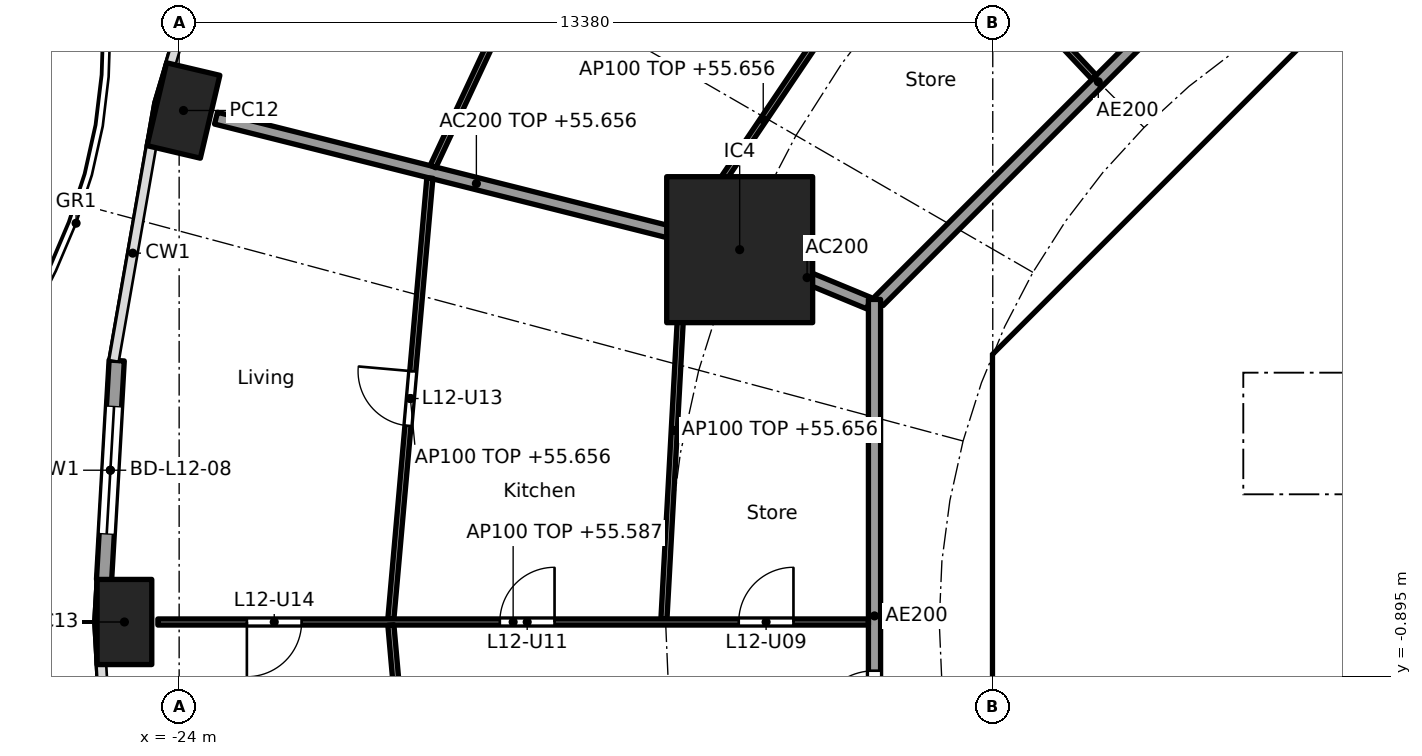
"""IFC4 building model, lengths in metres.
Left out: names, types, materials, properties, quantities, classifications, styles, units other than length and angle.
Written with IfcOpenShell. Run it as: python <this file> out.ifc"""

import sys

from ifc_helpers import new_model, si_unit, direction, frame, frame_2d, origin, origin_2d, place, context, subcontext, project, spatial, polyline, rectangle, hollow_rectangle, outline, extrude, element, fill, save


model = new_model("IFC4")
c1 = context("Model", 3, precision=1e-05, world=origin(), true_north=direction((0.0, 1.0)))
c2 = subcontext(c1, "Body", "Model", "MODEL_VIEW")
j1 = project(units=[si_unit("LENGTHUNIT", "METRE"), si_unit("PLANEANGLEUNIT", "RADIAN")], contexts=[c1])
p1 = place(None, origin())
s1 = spatial("IfcSite", under=j1, at=p1, CompositionType="ELEMENT")
p2 = place(p1, origin())
s2 = spatial("IfcBuilding", under=s1, at=p2, CompositionType="ELEMENT")
p3 = place(p2, frame((0.0, 0.0, 52.9)))
s3 = spatial("IfcBuildingStorey", under=s2, at=p3, CompositionType="ELEMENT", Elevation=52.9)
for number, where, z_axis, x_axis in (
    (1, (-23.929, 8.412, 0.0), (0.0, 0.0, 1.0), (-0.229, -0.973, 0.0)),
    (2, (-24.9, 0.0, 0.0), (0.0, 0.0, 1.0), (0.0, -1.0, 0.0)),
):
    element("IfcColumn", number, at=place(p3, frame(where, z_axis=z_axis, x_axis=x_axis)), inside=s3, PredefinedType="COLUMN", context=c2, shape_type="SweptSolid", body=[
        extrude(hollow_rectangle(XDim=1.4, YDim=0.9, WallThickness=0.05, at=origin_2d()), origin(), (0.0, 0.0, 1.0), 3.7),
    ])
p4 = place(p3, frame((-14.782, 6.123, 0.0), z_axis=(0.0, 0.0, 1.0), x_axis=(1.0, 0.0, 0.0)))
e3 = element("IfcColumn", 3, at=p4, inside=s3, PredefinedType="COLUMN", context=c2, shape_type="SweptSolid", body=[
    extrude(rectangle(XDim=2.4, YDim=2.4, at=origin_2d()), origin(), (0.0, 0.0, 1.0), 3.7),
])
p5 = place(p3, frame((-25.235, 0.692, 0.0), z_axis=(0.0, 0.0, 1.0), x_axis=(0.057478727308, 0.998346731305, 0.0)))
e4 = element("IfcWall", 4, at=p5, inside=s3, PredefinedType="SOLIDWALL", context=c2, shape_type="SweptSolid", body=[
    extrude(rectangle(XDim=3.615, YDim=0.25, at=frame_2d((1.807, 0.0))), origin(), (0.0, 0.0, 1.0), 3.44),
])
p6 = place(p5, frame((0.757, 0.0, 0.0)))
e5 = element("IfcOpeningElement", 5, at=p6, cuts=e4, PredefinedType="OPENING", context=c2, shape_type="SweptSolid", body=[
    extrude(rectangle(XDim=2.1, YDim=2.4, at=frame_2d((1.05, 1.2))), frame((0.0, 0.135, 0.0), z_axis=(0.0, -1.0, 0.0), x_axis=(1.0, 0.0, 0.0)), (0.0, 0.0, 1.0), 0.27),
])
p7 = place(p3, frame((-4.613, 9.988, 0.0), z_axis=(0.0, 0.0, 1.0), x_axis=(-0.707106781187, -0.707106781187, 0.0)))
e6 = element("IfcWall", 6, at=p7, inside=s3, PredefinedType="SHEAR", context=c2, shape_type="SweptSolid", body=[
    extrude(rectangle(XDim=7.602, YDim=0.6, at=frame_2d((3.801, 0.0))), origin(), (0.0, 0.0, 1.0), 3.44),
])
p8 = place(p7, frame((0.351, 0.0, 0.0)))
e7 = element("IfcOpeningElement", 7, at=p8, cuts=e6, PredefinedType="OPENING", context=c2, shape_type="SweptSolid", body=[
    extrude(rectangle(XDim=1.1, YDim=2.1, at=frame_2d((0.55, 1.05))), frame((0.0, 0.31, 0.0), z_axis=(0.0, -1.0, 0.0), x_axis=(1.0, 0.0, 0.0)), (0.0, 0.0, 1.0), 0.62),
])
p9 = place(p3, frame((-10.325, 3.801, 0.0), z_axis=(0.0, 0.0, 1.0), x_axis=(0.0, -1.0, 0.0)))
e8 = element("IfcWall", 8, at=p9, inside=s3, PredefinedType="SHEAR", context=c2, shape_type="SweptSolid", body=[
    extrude(rectangle(XDim=7.602, YDim=0.6, at=frame_2d((3.801, 0.0))), origin(), (0.0, 0.0, 1.0), 3.44),
])
p10 = place(p9, frame((0.651, 0.0, 0.0)))
e9 = element("IfcOpeningElement", 9, at=p10, cuts=e8, PredefinedType="OPENING", context=c2, shape_type="SweptSolid", body=[
    extrude(rectangle(XDim=1.5, YDim=2.1, at=frame_2d((0.75, 1.05))), frame((0.0, 0.31, 0.0), z_axis=(0.0, -1.0, 0.0), x_axis=(1.0, 0.0, 0.0)), (0.0, 0.0, 1.0), 0.62),
])
p11 = place(p9, frame((5.451, 0.0, 0.0)))
e10 = element("IfcOpeningElement", 10, at=p11, cuts=e8, PredefinedType="OPENING", context=c2, shape_type="SweptSolid", body=[
    extrude(rectangle(XDim=1.5, YDim=2.1, at=frame_2d((0.75, 1.05))), frame((0.0, 0.31, 0.0), z_axis=(0.0, -1.0, 0.0), x_axis=(1.0, 0.0, 0.0)), (0.0, 0.0, 1.0), 0.62),
])
p12 = place(p3, frame((-5.8, 4.3, 0.0), z_axis=(0.0, 0.0, 1.0), x_axis=(0.0, 1.0, 0.0)))
e11 = element("IfcWall", 11, at=p12, inside=s3, PredefinedType="PARTITIONING", context=c2, shape_type="SweptSolid", body=[
    extrude(rectangle(XDim=3.927, YDim=0.15, at=frame_2d((1.963, 0.0))), origin(), (0.0, 0.0, 1.0), 3.44),
])
p13 = place(p12, frame((1.551, 0.0, 0.0)))
e12 = element("IfcOpeningElement", 12, at=p13, cuts=e11, PredefinedType="OPENING", context=c2, shape_type="SweptSolid", body=[
    extrude(rectangle(XDim=0.9, YDim=2.1, at=frame_2d((0.45, 1.05))), frame((0.0, 0.085, 0.0), z_axis=(0.0, -1.0, 0.0), x_axis=(1.0, 0.0, 0.0)), (0.0, 0.0, 1.0), 0.17),
])
p14 = place(p3, frame((-6.7, 2.0, 0.0), z_axis=(0.0, 0.0, 1.0), x_axis=(1.0, 0.0, 0.0)))
e13 = element("IfcWall", 13, at=p14, inside=s3, PredefinedType="SOLIDWALL", context=c2, shape_type="SweptSolid", body=[
    extrude(rectangle(XDim=13.4, YDim=0.2, at=frame_2d((6.7, 0.0))), origin(), (0.0, 0.0, 1.0), 3.44),
])
p15 = place(p14, frame((0.65, 0.0, 0.0)))
e14 = element("IfcOpeningElement", 14, at=p15, cuts=e13, PredefinedType="OPENING", context=c2, shape_type="SweptSolid", body=[
    extrude(rectangle(XDim=1.1, YDim=2.1, at=frame_2d((0.55, 1.05))), frame((0.0, 0.11, 0.0), z_axis=(0.0, -1.0, 0.0), x_axis=(1.0, 0.0, 0.0)), (0.0, 0.0, 1.0), 0.22),
])
p16 = place(p14, frame((2.85, 0.0, 0.0)))
e15 = element("IfcOpeningElement", 15, at=p16, cuts=e13, PredefinedType="OPENING", context=c2, shape_type="SweptSolid", body=[
    extrude(rectangle(XDim=1.1, YDim=2.1, at=frame_2d((0.55, 1.05))), frame((0.0, 0.11, 0.0), z_axis=(0.0, -1.0, 0.0), x_axis=(1.0, 0.0, 0.0)), (0.0, 0.0, 1.0), 0.22),
])
p17 = place(p14, frame((5.05, 0.0, 0.0)))
e16 = element("IfcOpeningElement", 16, at=p17, cuts=e13, PredefinedType="OPENING", context=c2, shape_type="SweptSolid", body=[
    extrude(rectangle(XDim=1.1, YDim=2.1, at=frame_2d((0.55, 1.05))), frame((0.0, 0.11, 0.0), z_axis=(0.0, -1.0, 0.0), x_axis=(1.0, 0.0, 0.0)), (0.0, 0.0, 1.0), 0.22),
])
p18 = place(p3, origin())
e17 = element("IfcWall", 17, at=p18, inside=s3, PredefinedType="SHEAR", context=c2, shape_type="SweptSolid", body=[
    extrude(outline(polyline([(-10.2, 4.825), (-9.776, 4.401), (-10.025, 4.152), (-10.025, 3.801), (-10.625, 3.801), (-10.625, 4.401), (-10.2, 4.825)])), origin(), (0.0, 0.0, 1.0), 3.44),
])
p19 = place(p3, origin())
e18 = element("IfcWall", 18, at=p19, inside=s3, PredefinedType="SOLIDWALL", context=c2, shape_type="SweptSolid", body=[
    extrude(outline(polyline([(-6.5, 2.1), (-6.7, 2.1), (-6.7, 4.3), (6.7, 4.3), (6.7, 2.1), (6.5, 2.1), (6.5, 4.1), (4.5, 4.1), (4.5, 2.1), (4.3, 2.1), (4.3, 4.1), (2.3, 4.1), (2.3, 2.1), (2.1, 2.1), (2.1, 4.1), (0.1, 4.1), (0.1, 2.1), (-0.1, 2.1), (-0.1, 4.1), (-2.1, 4.1), (-2.1, 2.1), (-2.3, 2.1), (-2.3, 4.1), (-4.3, 4.1), (-4.3, 2.1), (-4.5, 2.1), (-4.5, 4.1), (-6.5, 4.1), (-6.5, 2.1)])), origin(), (0.0, 0.0, 1.0), 3.44),
])
p20 = place(p3, frame((-10.025, 4.0, 0.0), z_axis=(0.0, 0.0, 1.0), x_axis=(1.0, 0.0, 0.0)))
e19 = element("IfcWall", 19, at=p20, inside=s3, PredefinedType="PARTITIONING", context=c2, shape_type="SweptSolid", body=[
    extrude(rectangle(XDim=3.325, YDim=0.2, at=frame_2d((1.662, 0.0))), origin(), (0.0, 0.0, 1.0), 3.44),
])
p21 = place(p3, frame((-12.657, 5.243, 0.0), z_axis=(0.0, 0.0, 1.0), x_axis=(-0.923885664896, 0.382668627144, 0.0)))
e20 = element("IfcWall", 20, at=p21, inside=s3, PredefinedType="PARTITIONING", context=c2, shape_type="SweptSolid", body=[
    extrude(rectangle(XDim=2.2, YDim=0.2, at=frame_2d((1.1, 0.0))), origin(), (0.0, 0.0, 1.0), 3.44),
])
p22 = place(p3, frame((-14.831, 6.135, 0.0), z_axis=(0.0, 0.0, 1.0), x_axis=(-0.969884949569, 0.243563512454, 0.0)))
e21 = element("IfcWall", 21, at=p22, inside=s3, PredefinedType="PARTITIONING", context=c2, shape_type="SweptSolid", body=[
    extrude(rectangle(XDim=8.829, YDim=0.2, at=frame_2d((4.415, 0.0))), origin(), (0.0, 0.0, 1.0), 2.756),
])
p23 = place(p3, frame((-5.275, 12.494, 0.0), z_axis=(0.0, 0.0, 1.0), x_axis=(-0.707106781187, -0.707106781187, 0.0)))
e22 = element("IfcWall", 22, at=p23, inside=s3, PredefinedType="PARTITIONING", context=c2, shape_type="SweptSolid", body=[
    extrude(rectangle(XDim=10.209, YDim=0.2, at=frame_2d((5.104, 0.0))), origin(), (0.0, 0.0, 1.0), 3.44),
])
p24 = place(p23, frame((2.87, 0.0, 0.0)))
e23 = element("IfcOpeningElement", 23, at=p24, cuts=e22, PredefinedType="OPENING", context=c2, shape_type="SweptSolid", body=[
    extrude(rectangle(XDim=1.0, YDim=2.1, at=frame_2d((0.5, 1.05))), frame((0.0, 0.11, 0.0), z_axis=(0.0, -1.0, 0.0), x_axis=(1.0, 0.0, 0.0)), (0.0, 0.0, 1.0), 0.22),
])
p25 = place(p3, frame((-12.565, 5.304, 0.0), z_axis=(0.0, 0.0, 1.0), x_axis=(0.0, -1.0, 0.0)))
e24 = element("IfcWall", 24, at=p25, inside=s3, PredefinedType="PARTITIONING", context=c2, shape_type="SweptSolid", body=[
    extrude(rectangle(XDim=10.409, YDim=0.2, at=frame_2d((5.205, 0.0))), origin(), (0.0, 0.0, 1.0), 3.44),
])
p26 = place(p25, frame((6.106, 0.0, 0.0)))
e25 = element("IfcOpeningElement", 25, at=p26, cuts=e24, PredefinedType="OPENING", context=c2, shape_type="SweptSolid", body=[
    extrude(rectangle(XDim=1.0, YDim=2.1, at=frame_2d((0.5, 1.05))), frame((0.0, 0.11, 0.0), z_axis=(0.0, -1.0, 0.0), x_axis=(1.0, 0.0, 0.0)), (0.0, 0.0, 1.0), 0.22),
])
p27 = place(p3, frame((-8.953, 8.958, 0.0), z_axis=(0.0, 0.0, 1.0), x_axis=(-0.684574307023, 0.728943082939, 0.0)))
e26 = element("IfcWall", 26, at=p27, inside=s3, PredefinedType="PARTITIONING", context=c2, shape_type="SweptSolid", body=[
    extrude(rectangle(XDim=15.231, YDim=0.1, at=frame_2d((7.615, 0.0))), origin(), (0.0, 0.0, 1.0), 2.687),
])
p28 = place(p27, frame((1.54, 0.0, 0.0)))
e27 = element("IfcOpeningElement", 27, at=p28, cuts=e26, PredefinedType="OPENING", context=c2, shape_type="SweptSolid", body=[
    extrude(rectangle(XDim=0.9, YDim=2.1, at=frame_2d((0.45, 1.05))), frame((0.0, 0.06, 0.0), z_axis=(0.0, -1.0, 0.0), x_axis=(1.0, 0.0, 0.0)), (0.0, 0.0, 1.0), 0.12),
])
p29 = place(p27, frame((6.174, 0.0, 0.0)))
e28 = element("IfcOpeningElement", 28, at=p29, cuts=e26, PredefinedType="OPENING", context=c2, shape_type="SweptSolid", body=[
    extrude(rectangle(XDim=0.9, YDim=2.1, at=frame_2d((0.45, 1.05))), frame((0.0, 0.06, 0.0), z_axis=(0.0, -1.0, 0.0), x_axis=(1.0, 0.0, 0.0)), (0.0, 0.0, 1.0), 0.12),
])
p30 = place(p27, frame((11.8, 0.0, 0.0)))
e29 = element("IfcOpeningElement", 29, at=p30, cuts=e26, PredefinedType="OPENING", context=c2, shape_type="SweptSolid", body=[
    extrude(rectangle(XDim=0.9, YDim=2.1, at=frame_2d((0.45, 1.05))), frame((0.0, 0.06, 0.0), z_axis=(0.0, -1.0, 0.0), x_axis=(1.0, 0.0, 0.0)), (0.0, 0.0, 1.0), 0.12),
])
p31 = place(p3, frame((-13.162, 10.087, 0.0), z_axis=(0.0, 0.0, 1.0), x_axis=(-0.55912750241, -0.829081682375, 0.0)))
e30 = element("IfcWall", 30, at=p31, inside=s3, PredefinedType="PARTITIONING", context=c2, shape_type="SweptSolid", body=[
    extrude(rectangle(XDim=4.408, YDim=0.1, at=frame_2d((2.204, 0.0))), origin(), (0.0, 0.0, 1.0), 2.756),
])
p32 = place(p3, frame((-17.203, 13.095, 0.0), z_axis=(0.0, 0.0, 1.0), x_axis=(-0.423926333401, -0.905696673202, 0.0)))
e31 = element("IfcWall", 31, at=p32, inside=s3, PredefinedType="PARTITIONING", context=c2, shape_type="SweptSolid", body=[
    extrude(rectangle(XDim=6.188, YDim=0.1, at=frame_2d((3.094, 0.0))), origin(), (0.0, 0.0, 1.0), 2.756),
])
p33 = place(p3, frame((-15.688, 6.249, 0.0), z_axis=(0.0, 0.0, 1.0), x_axis=(-0.054659814056, -0.998505034903, 0.0)))
e32 = element("IfcWall", 32, at=p33, inside=s3, PredefinedType="PARTITIONING", context=c2, shape_type="SweptSolid", body=[
    extrude(rectangle(XDim=6.208, YDim=0.1, at=frame_2d((3.104, 0.0))), origin(), (0.0, 0.0, 1.0), 2.756),
])
p34 = place(p3, frame((-19.877, 7.301, 0.0), z_axis=(0.0, 0.0, 1.0), x_axis=(-0.088143415068, -0.996107794558, 0.0)))
e33 = element("IfcWall", 33, at=p34, inside=s3, PredefinedType="PARTITIONING", context=c2, shape_type="SweptSolid", body=[
    extrude(rectangle(XDim=7.279, YDim=0.1, at=frame_2d((3.64, 0.0))), origin(), (0.0, 0.0, 1.0), 2.756),
])
p35 = place(p34, frame((3.189, 0.0, 0.0)))
e34 = element("IfcOpeningElement", 34, at=p35, cuts=e33, PredefinedType="OPENING", context=c2, shape_type="SweptSolid", body=[
    extrude(rectangle(XDim=0.9, YDim=2.1, at=frame_2d((0.45, 1.05))), frame((0.0, 0.06, 0.0), z_axis=(0.0, -1.0, 0.0), x_axis=(1.0, 0.0, 0.0)), (0.0, 0.0, 1.0), 0.12),
])
p36 = place(p3, frame((-12.665, 0.0, 0.0), z_axis=(0.0, 0.0, 1.0), x_axis=(-1.0, 0.0, 0.0)))
e35 = element("IfcWall", 35, at=p36, inside=s3, PredefinedType="PARTITIONING", context=c2, shape_type="SweptSolid", body=[
    extrude(rectangle(XDim=11.685, YDim=0.1, at=frame_2d((5.843, 0.0))), origin(), (0.0, 0.0, 1.0), 2.687),
])
p37 = place(p36, frame((1.233, 0.0, 0.0)))
e36 = element("IfcOpeningElement", 36, at=p37, cuts=e35, PredefinedType="OPENING", context=c2, shape_type="SweptSolid", body=[
    extrude(rectangle(XDim=0.9, YDim=2.1, at=frame_2d((0.45, 1.05))), frame((0.0, 0.06, 0.0), z_axis=(0.0, -1.0, 0.0), x_axis=(1.0, 0.0, 0.0)), (0.0, 0.0, 1.0), 0.12),
])
p38 = place(p36, frame((5.162, 0.0, 0.0)))
e37 = element("IfcOpeningElement", 37, at=p38, cuts=e35, PredefinedType="OPENING", context=c2, shape_type="SweptSolid", body=[
    extrude(rectangle(XDim=0.9, YDim=2.1, at=frame_2d((0.45, 1.05))), frame((0.0, 0.06, 0.0), z_axis=(0.0, -1.0, 0.0), x_axis=(1.0, 0.0, 0.0)), (0.0, 0.0, 1.0), 0.12),
])
p39 = place(p36, frame((9.322, 0.0, 0.0)))
e38 = element("IfcOpeningElement", 38, at=p39, cuts=e35, PredefinedType="OPENING", context=c2, shape_type="SweptSolid", body=[
    extrude(rectangle(XDim=0.9, YDim=2.1, at=frame_2d((0.45, 1.05))), frame((0.0, 0.06, 0.0), z_axis=(0.0, -1.0, 0.0), x_axis=(1.0, 0.0, 0.0)), (0.0, 0.0, 1.0), 0.12),
])
p40 = place(p3, frame((-20.518, -0.05, 0.0), z_axis=(0.0, 0.0, 1.0), x_axis=(0.088143415068, -0.996107794558, 0.0)))
e39 = element("IfcWall", 39, at=p40, inside=s3, PredefinedType="PARTITIONING", context=c2, shape_type="SweptSolid", body=[
    extrude(rectangle(XDim=7.279, YDim=0.1, at=frame_2d((3.64, 0.0))), origin(), (0.0, 0.0, 1.0), 2.756),
])
p41 = place(p6, origin())
e40 = element("IfcDoor", 40, at=p41, inside=s3, OperationType="SLIDING_TO_LEFT", PredefinedType="DOOR", context=c2, shape_type="SweptSolid", body=[
    extrude(rectangle(XDim=2.1, YDim=2.4, at=frame_2d((1.05, 1.2))), frame((0.0, 0.025, 0.0), z_axis=(0.0, -1.0, 0.0), x_axis=(1.0, 0.0, 0.0)), (0.0, 0.0, 1.0), 0.05),
])
fill(e5, e40)
p42 = place(p15, origin())
e41 = element("IfcDoor", 41, at=p42, inside=s3, OperationType="DOUBLE_DOOR_SLIDING", PredefinedType="DOOR", context=c2, shape_type="SweptSolid", body=[
    extrude(rectangle(XDim=1.1, YDim=2.1, at=frame_2d((0.55, 1.05))), frame((0.0, 0.025, 0.0), z_axis=(0.0, -1.0, 0.0), x_axis=(1.0, 0.0, 0.0)), (0.0, 0.0, 1.0), 0.05),
])
fill(e14, e41)
p43 = place(p13, origin())
e42 = element("IfcDoor", 42, at=p43, inside=s3, OperationType="SINGLE_SWING_LEFT", PredefinedType="DOOR", context=c2, shape_type="SweptSolid", body=[
    extrude(rectangle(XDim=0.9, YDim=2.1, at=frame_2d((0.45, 1.05))), frame((0.0, 0.025, 0.0), z_axis=(0.0, -1.0, 0.0), x_axis=(1.0, 0.0, 0.0)), (0.0, 0.0, 1.0), 0.05),
])
fill(e12, e42)
p44 = place(p10, origin())
e43 = element("IfcDoor", 43, at=p44, inside=s3, OperationType="DOUBLE_DOOR_SINGLE_SWING", PredefinedType="DOOR", context=c2, shape_type="SweptSolid", body=[
    extrude(rectangle(XDim=1.5, YDim=2.1, at=frame_2d((0.75, 1.05))), frame((0.0, 0.025, 0.0), z_axis=(0.0, -1.0, 0.0), x_axis=(1.0, 0.0, 0.0)), (0.0, 0.0, 1.0), 0.05),
])
fill(e9, e43)
p45 = place(p8, origin())
e44 = element("IfcDoor", 44, at=p45, inside=s3, OperationType="SINGLE_SWING_LEFT", PredefinedType="DOOR", context=c2, shape_type="SweptSolid", body=[
    extrude(rectangle(XDim=1.1, YDim=2.1, at=frame_2d((0.55, 1.05))), frame((0.0, 0.025, 0.0), z_axis=(0.0, -1.0, 0.0), x_axis=(1.0, 0.0, 0.0)), (0.0, 0.0, 1.0), 0.05),
])
fill(e7, e44)
p46 = place(p26, frame((1.0, 0.0, 0.0), x_axis=(-1.0, 0.0, 0.0)))
e45 = element("IfcDoor", 45, at=p46, inside=s3, OperationType="SINGLE_SWING_LEFT", PredefinedType="DOOR", context=c2, shape_type="SweptSolid", body=[
    extrude(rectangle(XDim=1.0, YDim=2.1, at=frame_2d((0.5, 1.05))), frame((0.0, 0.025, 0.0), z_axis=(0.0, -1.0, 0.0), x_axis=(1.0, 0.0, 0.0)), (0.0, 0.0, 1.0), 0.05),
])
fill(e25, e45)
p47 = place(p37, frame((0.9, 0.0, 0.0), x_axis=(-1.0, 0.0, 0.0)))
e46 = element("IfcDoor", 46, at=p47, inside=s3, OperationType="SINGLE_SWING_RIGHT", PredefinedType="DOOR", context=c2, shape_type="SweptSolid", body=[
    extrude(rectangle(XDim=0.9, YDim=2.1, at=frame_2d((0.45, 1.05))), frame((0.0, 0.025, 0.0), z_axis=(0.0, -1.0, 0.0), x_axis=(1.0, 0.0, 0.0)), (0.0, 0.0, 1.0), 0.05),
])
fill(e36, e46)
p48 = place(p38, frame((0.9, 0.0, 0.0), x_axis=(-1.0, 0.0, 0.0)))
e47 = element("IfcDoor", 47, at=p48, inside=s3, OperationType="SINGLE_SWING_RIGHT", PredefinedType="DOOR", context=c2, shape_type="SweptSolid", body=[
    extrude(rectangle(XDim=0.9, YDim=2.1, at=frame_2d((0.45, 1.05))), frame((0.0, 0.025, 0.0), z_axis=(0.0, -1.0, 0.0), x_axis=(1.0, 0.0, 0.0)), (0.0, 0.0, 1.0), 0.05),
])
fill(e37, e47)
p49 = place(p35, frame((0.9, 0.0, 0.0), x_axis=(-1.0, 0.0, 0.0)))
e48 = element("IfcDoor", 48, at=p49, inside=s3, OperationType="SINGLE_SWING_RIGHT", PredefinedType="DOOR", context=c2, shape_type="SweptSolid", body=[
    extrude(rectangle(XDim=0.9, YDim=2.1, at=frame_2d((0.45, 1.05))), frame((0.0, 0.025, 0.0), z_axis=(0.0, -1.0, 0.0), x_axis=(1.0, 0.0, 0.0)), (0.0, 0.0, 1.0), 0.05),
])
fill(e34, e48)
p50 = place(p39, origin())
e49 = element("IfcDoor", 49, at=p50, inside=s3, OperationType="SINGLE_SWING_RIGHT", PredefinedType="DOOR", context=c2, shape_type="SweptSolid", body=[
    extrude(rectangle(XDim=0.9, YDim=2.1, at=frame_2d((0.45, 1.05))), frame((0.0, 0.025, 0.0), z_axis=(0.0, -1.0, 0.0), x_axis=(1.0, 0.0, 0.0)), (0.0, 0.0, 1.0), 0.05),
])
fill(e38, e49)
save(model, sys.argv[1])
